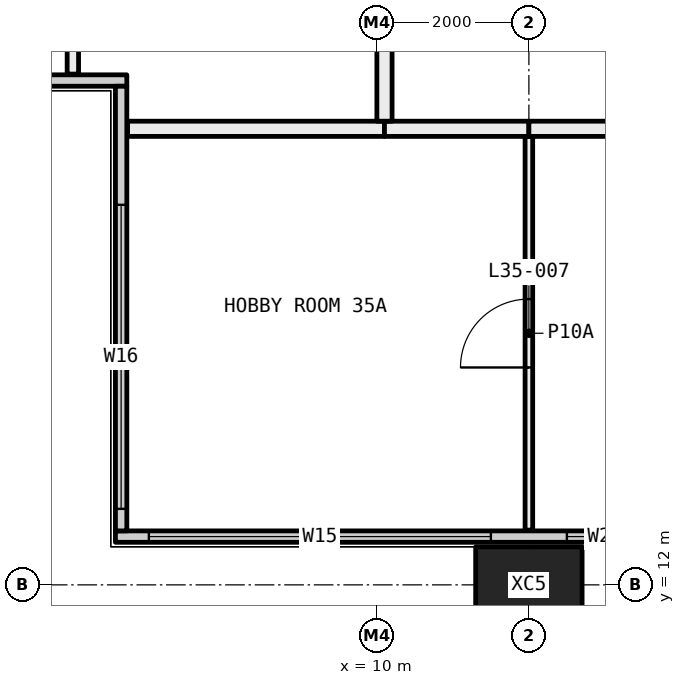
"""IFC4 building model, lengths in metres.
Left out: names, types, materials, properties, quantities, classifications, styles, units other than length and angle.
Written with IfcOpenShell. Run it as: python <this file> out.ifc"""

import sys

from ifc_helpers import new_model, si_unit, direction, frame, frame_2d, origin, origin_2d, place, context, subcontext, project, spatial, rectangle, hollow_rectangle, extrude, element, fill, save


model = new_model("IFC4")
c1 = context("Model", 3, precision=1e-05, world=origin(), true_north=direction((0.0, 1.0)))
c2 = subcontext(c1, "Body", "Model", "MODEL_VIEW")
j1 = project(units=[si_unit("LENGTHUNIT", "METRE"), si_unit("PLANEANGLEUNIT", "RADIAN")], contexts=[c1])
p1 = place(None, origin())
s1 = spatial("IfcSite", under=j1, at=p1, CompositionType="ELEMENT")
p2 = place(p1, origin())
s2 = spatial("IfcBuilding", under=s1, at=p2, CompositionType="ELEMENT")
p3 = place(p2, frame((0.0, 0.0, 134.55)))
s3 = spatial("IfcBuildingStorey", under=s2, at=p3, CompositionType="ELEMENT", Elevation=134.55)
p4 = place(p3, frame((12.0, 12.0, -0.4), z_axis=(0.0, 0.0, 1.0), x_axis=(1.0, 0.0, 0.0)))
e1 = element("IfcColumn", 1, at=p4, inside=s3, PredefinedType="COLUMN", context=c2, shape_type="SweptSolid", body=[
    extrude(hollow_rectangle(XDim=1.4, YDim=1.0, WallThickness=0.055, at=origin_2d()), origin(), (0.0, 0.0, 1.0), 3.45),
])
p5 = place(p3, frame((6.56, 12.635, 0.0), z_axis=(0.0, 0.0, 1.0), x_axis=(1.0, 0.0, 0.0)))
e2 = element("IfcWall", 2, at=p5, inside=s3, PredefinedType="ELEMENTEDWALL", context=c2, shape_type="SweptSolid", body=[
    extrude(rectangle(XDim=58.88, YDim=0.15, at=frame_2d((29.44, 0.0))), origin(), (0.0, 0.0, 1.0), 3.05),
])
p6 = place(p5, frame((0.44, 0.0, 0.45)))
e3 = element("IfcOpeningElement", 3, at=p6, cuts=e2, PredefinedType="OPENING", context=c2, shape_type="SweptSolid", body=[
    extrude(rectangle(XDim=4.5, YDim=2.55, at=frame_2d((2.25, 1.275))), frame((0.0, 0.085, 0.0), z_axis=(0.0, -1.0, 0.0), x_axis=(1.0, 0.0, 0.0)), (0.0, 0.0, 1.0), 0.17),
])
p7 = place(p5, frame((5.94, 0.0, 0.45)))
e4 = element("IfcOpeningElement", 4, at=p7, cuts=e2, PredefinedType="OPENING", context=c2, shape_type="SweptSolid", body=[
    extrude(rectangle(XDim=1.0, YDim=2.55, at=frame_2d((0.5, 1.275))), frame((0.0, 0.085, 0.0), z_axis=(0.0, -1.0, 0.0), x_axis=(1.0, 0.0, 0.0)), (0.0, 0.0, 1.0), 0.17),
])
p8 = place(p5, frame((9.44, 0.0, 0.45)))
e5 = element("IfcOpeningElement", 5, at=p8, cuts=e2, PredefinedType="OPENING", context=c2, shape_type="SweptSolid", body=[
    extrude(rectangle(XDim=1.5, YDim=2.55, at=frame_2d((0.75, 1.275))), frame((0.0, 0.085, 0.0), z_axis=(0.0, -1.0, 0.0), x_axis=(1.0, 0.0, 0.0)), (0.0, 0.0, 1.0), 0.17),
])
p9 = place(p5, frame((11.94, 0.0, 0.45)))
e6 = element("IfcOpeningElement", 6, at=p9, cuts=e2, PredefinedType="OPENING", context=c2, shape_type="SweptSolid", body=[
    extrude(rectangle(XDim=1.5, YDim=2.55, at=frame_2d((0.75, 1.275))), frame((0.0, 0.085, 0.0), z_axis=(0.0, -1.0, 0.0), x_axis=(1.0, 0.0, 0.0)), (0.0, 0.0, 1.0), 0.17),
])
p10 = place(p5, frame((15.94, 0.0, 0.45)))
e7 = element("IfcOpeningElement", 7, at=p10, cuts=e2, PredefinedType="OPENING", context=c2, shape_type="SweptSolid", body=[
    extrude(rectangle(XDim=1.0, YDim=2.55, at=frame_2d((0.5, 1.275))), frame((0.0, 0.085, 0.0), z_axis=(0.0, -1.0, 0.0), x_axis=(1.0, 0.0, 0.0)), (0.0, 0.0, 1.0), 0.17),
])
p11 = place(p5, frame((17.94, 0.0, 0.45)))
e8 = element("IfcOpeningElement", 8, at=p11, cuts=e2, PredefinedType="OPENING", context=c2, shape_type="SweptSolid", body=[
    extrude(rectangle(XDim=1.0, YDim=2.55, at=frame_2d((0.5, 1.275))), frame((0.0, 0.085, 0.0), z_axis=(0.0, -1.0, 0.0), x_axis=(1.0, 0.0, 0.0)), (0.0, 0.0, 1.0), 0.17),
])
p12 = place(p5, frame((21.44, 0.0, 0.45)))
e9 = element("IfcOpeningElement", 9, at=p12, cuts=e2, PredefinedType="OPENING", context=c2, shape_type="SweptSolid", body=[
    extrude(rectangle(XDim=1.5, YDim=2.55, at=frame_2d((0.75, 1.275))), frame((0.0, 0.085, 0.0), z_axis=(0.0, -1.0, 0.0), x_axis=(1.0, 0.0, 0.0)), (0.0, 0.0, 1.0), 0.17),
])
p13 = place(p5, frame((23.94, 0.0, 0.45)))
e10 = element("IfcOpeningElement", 10, at=p13, cuts=e2, PredefinedType="OPENING", context=c2, shape_type="SweptSolid", body=[
    extrude(rectangle(XDim=1.5, YDim=2.55, at=frame_2d((0.75, 1.275))), frame((0.0, 0.085, 0.0), z_axis=(0.0, -1.0, 0.0), x_axis=(1.0, 0.0, 0.0)), (0.0, 0.0, 1.0), 0.17),
])
p14 = place(p5, frame((27.94, 0.0, 0.45)))
e11 = element("IfcOpeningElement", 11, at=p14, cuts=e2, PredefinedType="OPENING", context=c2, shape_type="SweptSolid", body=[
    extrude(rectangle(XDim=1.0, YDim=2.55, at=frame_2d((0.5, 1.275))), frame((0.0, 0.085, 0.0), z_axis=(0.0, -1.0, 0.0), x_axis=(1.0, 0.0, 0.0)), (0.0, 0.0, 1.0), 0.17),
])
p15 = place(p5, frame((29.94, 0.0, 0.45)))
e12 = element("IfcOpeningElement", 12, at=p15, cuts=e2, PredefinedType="OPENING", context=c2, shape_type="SweptSolid", body=[
    extrude(rectangle(XDim=1.0, YDim=2.55, at=frame_2d((0.5, 1.275))), frame((0.0, 0.085, 0.0), z_axis=(0.0, -1.0, 0.0), x_axis=(1.0, 0.0, 0.0)), (0.0, 0.0, 1.0), 0.17),
])
p16 = place(p5, frame((33.44, 0.0, 0.45)))
e13 = element("IfcOpeningElement", 13, at=p16, cuts=e2, PredefinedType="OPENING", context=c2, shape_type="SweptSolid", body=[
    extrude(rectangle(XDim=1.5, YDim=2.55, at=frame_2d((0.75, 1.275))), frame((0.0, 0.085, 0.0), z_axis=(0.0, -1.0, 0.0), x_axis=(1.0, 0.0, 0.0)), (0.0, 0.0, 1.0), 0.17),
])
p17 = place(p5, frame((35.94, 0.0, 0.45)))
e14 = element("IfcOpeningElement", 14, at=p17, cuts=e2, PredefinedType="OPENING", context=c2, shape_type="SweptSolid", body=[
    extrude(rectangle(XDim=1.5, YDim=2.55, at=frame_2d((0.75, 1.275))), frame((0.0, 0.085, 0.0), z_axis=(0.0, -1.0, 0.0), x_axis=(1.0, 0.0, 0.0)), (0.0, 0.0, 1.0), 0.17),
])
p18 = place(p5, frame((39.94, 0.0, 0.45)))
e15 = element("IfcOpeningElement", 15, at=p18, cuts=e2, PredefinedType="OPENING", context=c2, shape_type="SweptSolid", body=[
    extrude(rectangle(XDim=1.0, YDim=2.55, at=frame_2d((0.5, 1.275))), frame((0.0, 0.085, 0.0), z_axis=(0.0, -1.0, 0.0), x_axis=(1.0, 0.0, 0.0)), (0.0, 0.0, 1.0), 0.17),
])
p19 = place(p5, frame((41.94, 0.0, 0.45)))
e16 = element("IfcOpeningElement", 16, at=p19, cuts=e2, PredefinedType="OPENING", context=c2, shape_type="SweptSolid", body=[
    extrude(rectangle(XDim=1.0, YDim=2.55, at=frame_2d((0.5, 1.275))), frame((0.0, 0.085, 0.0), z_axis=(0.0, -1.0, 0.0), x_axis=(1.0, 0.0, 0.0)), (0.0, 0.0, 1.0), 0.17),
])
p20 = place(p5, frame((45.44, 0.0, 0.45)))
e17 = element("IfcOpeningElement", 17, at=p20, cuts=e2, PredefinedType="OPENING", context=c2, shape_type="SweptSolid", body=[
    extrude(rectangle(XDim=1.5, YDim=2.55, at=frame_2d((0.75, 1.275))), frame((0.0, 0.085, 0.0), z_axis=(0.0, -1.0, 0.0), x_axis=(1.0, 0.0, 0.0)), (0.0, 0.0, 1.0), 0.17),
])
p21 = place(p5, frame((47.94, 0.0, 0.45)))
e18 = element("IfcOpeningElement", 18, at=p21, cuts=e2, PredefinedType="OPENING", context=c2, shape_type="SweptSolid", body=[
    extrude(rectangle(XDim=1.5, YDim=2.55, at=frame_2d((0.75, 1.275))), frame((0.0, 0.085, 0.0), z_axis=(0.0, -1.0, 0.0), x_axis=(1.0, 0.0, 0.0)), (0.0, 0.0, 1.0), 0.17),
])
p22 = place(p5, frame((51.94, 0.0, 0.45)))
e19 = element("IfcOpeningElement", 19, at=p22, cuts=e2, PredefinedType="OPENING", context=c2, shape_type="SweptSolid", body=[
    extrude(rectangle(XDim=1.0, YDim=2.55, at=frame_2d((0.5, 1.275))), frame((0.0, 0.085, 0.0), z_axis=(0.0, -1.0, 0.0), x_axis=(1.0, 0.0, 0.0)), (0.0, 0.0, 1.0), 0.17),
])
p23 = place(p5, frame((53.94, 0.0, 0.45)))
e20 = element("IfcOpeningElement", 20, at=p23, cuts=e2, PredefinedType="OPENING", context=c2, shape_type="SweptSolid", body=[
    extrude(rectangle(XDim=4.5, YDim=2.55, at=frame_2d((2.25, 1.275))), frame((0.0, 0.085, 0.0), z_axis=(0.0, -1.0, 0.0), x_axis=(1.0, 0.0, 0.0)), (0.0, 0.0, 1.0), 0.17),
])
p24 = place(p3, frame((0.56, 18.635, 0.0), z_axis=(0.0, 0.0, 1.0), x_axis=(1.0, 0.0, 0.0)))
e21 = element("IfcWall", 21, at=p24, inside=s3, PredefinedType="ELEMENTEDWALL", context=c2, shape_type="SweptSolid", body=[
    extrude(rectangle(XDim=6.15, YDim=0.15, at=frame_2d((3.075, 0.0))), origin(), (0.0, 0.0, 1.0), 3.05),
])
p25 = place(p24, frame((0.44, 0.0, 0.45)))
e22 = element("IfcOpeningElement", 22, at=p25, cuts=e21, PredefinedType="OPENING", context=c2, shape_type="SweptSolid", body=[
    extrude(rectangle(XDim=4.0, YDim=2.55, at=frame_2d((2.0, 1.275))), frame((0.0, 0.085, 0.0), z_axis=(0.0, -1.0, 0.0), x_axis=(1.0, 0.0, 0.0)), (0.0, 0.0, 1.0), 0.17),
])
p26 = place(p3, frame((6.635, 12.71, 0.0), z_axis=(0.0, 0.0, 1.0), x_axis=(0.0, 1.0, 0.0)))
e23 = element("IfcWall", 23, at=p26, inside=s3, PredefinedType="ELEMENTEDWALL", context=c2, shape_type="SweptSolid", body=[
    extrude(rectangle(XDim=5.85, YDim=0.15, at=frame_2d((2.925, 0.0))), origin(), (0.0, 0.0, 1.0), 3.05),
])
p27 = place(p26, frame((0.29, 0.0, 0.45)))
e24 = element("IfcOpeningElement", 24, at=p27, cuts=e23, PredefinedType="OPENING", context=c2, shape_type="SweptSolid", body=[
    extrude(rectangle(XDim=4.0, YDim=2.55, at=frame_2d((2.0, 1.275))), frame((0.0, 0.085, 0.0), z_axis=(0.0, -1.0, 0.0), x_axis=(1.0, 0.0, 0.0)), (0.0, 0.0, 1.0), 0.17),
])
p28 = place(p3, frame((12.0, 12.72, 0.0), z_axis=(0.0, 0.0, 1.0), x_axis=(0.0, 1.0, 0.0)))
e25 = element("IfcWall", 25, at=p28, inside=s3, PredefinedType="PARTITIONING", context=c2, shape_type="SweptSolid", body=[
    extrude(rectangle(XDim=5.18, YDim=0.1, at=frame_2d((2.59, 0.0))), origin(), (0.0, 0.0, 1.0), 3.05),
])
p29 = place(p28, frame((2.14, 0.0, 0.0)))
e26 = element("IfcOpeningElement", 26, at=p29, cuts=e25, PredefinedType="OPENING", context=c2, shape_type="SweptSolid", body=[
    extrude(rectangle(XDim=0.9, YDim=2.1, at=frame_2d((0.45, 1.05))), frame((0.0, 0.06, 0.0), z_axis=(0.0, -1.0, 0.0), x_axis=(1.0, 0.0, 0.0)), (0.0, 0.0, 1.0), 0.12),
])
p30 = place(p3, frame((10.1, 18.0, 0.0), z_axis=(0.0, 0.0, 1.0), x_axis=(-1.0, 0.0, 0.0)))
e27 = element("IfcWall", 27, at=p30, inside=s3, PredefinedType="PARTITIONING", context=c2, shape_type="SweptSolid", body=[
    extrude(rectangle(XDim=3.38, YDim=0.2, at=frame_2d((1.69, 0.0))), origin(), (0.0, 0.0, 1.0), 3.05),
])
p31 = place(p3, frame((12.0, 18.0, 0.0), z_axis=(0.0, 0.0, 1.0), x_axis=(-1.0, 0.0, 0.0)))
e28 = element("IfcWall", 28, at=p31, inside=s3, PredefinedType="PARTITIONING", context=c2, shape_type="SweptSolid", body=[
    extrude(rectangle(XDim=1.9, YDim=0.2, at=frame_2d((0.95, 0.0))), origin(), (0.0, 0.0, 1.0), 3.05),
])
p32 = place(p3, frame((18.0, 18.0, 0.0), z_axis=(0.0, 0.0, 1.0), x_axis=(-1.0, 0.0, 0.0)))
e29 = element("IfcWall", 29, at=p32, inside=s3, PredefinedType="PARTITIONING", context=c2, shape_type="SweptSolid", body=[
    extrude(rectangle(XDim=6.0, YDim=0.2, at=frame_2d((3.0, 0.0))), origin(), (0.0, 0.0, 1.0), 3.05),
])
p33 = place(p3, frame((6.0, 18.72, 0.0), z_axis=(0.0, 0.0, 1.0), x_axis=(0.0, 1.0, 0.0)))
e30 = element("IfcWall", 30, at=p33, inside=s3, PredefinedType="PARTITIONING", context=c2, shape_type="SweptSolid", body=[
    extrude(rectangle(XDim=3.78, YDim=0.15, at=frame_2d((1.89, 0.0))), origin(), (0.0, 0.0, 1.0), 3.05),
])
p34 = place(p3, frame((10.1, 18.1, 0.0), z_axis=(0.0, 0.0, 1.0), x_axis=(0.0, 1.0, 0.0)))
e31 = element("IfcWall", 31, at=p34, inside=s3, PredefinedType="PARTITIONING", context=c2, shape_type="SweptSolid", body=[
    extrude(rectangle(XDim=4.4, YDim=0.2, at=frame_2d((2.2, 0.0))), origin(), (0.0, 0.0, 1.0), 3.05),
])
p35 = place(p6, origin())
e32 = element("IfcWindow", 32, at=p35, inside=s3, PartitioningType="SINGLE_PANEL", PredefinedType="WINDOW", context=c2, shape_type="SweptSolid", body=[
    extrude(rectangle(XDim=4.5, YDim=2.55, at=frame_2d((2.25, 1.275))), frame((0.0, 0.03, 0.0), z_axis=(0.0, -1.0, 0.0), x_axis=(1.0, 0.0, 0.0)), (0.0, 0.0, 1.0), 0.06),
])
fill(e3, e32)
p36 = place(p7, origin())
e33 = element("IfcWindow", 33, at=p36, inside=s3, PartitioningType="SINGLE_PANEL", PredefinedType="WINDOW", context=c2, shape_type="SweptSolid", body=[
    extrude(rectangle(XDim=1.0, YDim=2.55, at=frame_2d((0.5, 1.275))), frame((0.0, 0.03, 0.0), z_axis=(0.0, -1.0, 0.0), x_axis=(1.0, 0.0, 0.0)), (0.0, 0.0, 1.0), 0.06),
])
fill(e4, e33)
p37 = place(p27, origin())
e34 = element("IfcWindow", 34, at=p37, inside=s3, PartitioningType="SINGLE_PANEL", PredefinedType="WINDOW", context=c2, shape_type="SweptSolid", body=[
    extrude(rectangle(XDim=4.0, YDim=2.55, at=frame_2d((2.0, 1.275))), frame((0.0, 0.03, 0.0), z_axis=(0.0, -1.0, 0.0), x_axis=(1.0, 0.0, 0.0)), (0.0, 0.0, 1.0), 0.06),
])
fill(e24, e34)
p38 = place(p29, origin())
e35 = element("IfcDoor", 35, at=p38, inside=s3, OperationType="SINGLE_SWING_RIGHT", PredefinedType="DOOR", context=c2, shape_type="SweptSolid", body=[
    extrude(rectangle(XDim=0.9, YDim=2.1, at=frame_2d((0.45, 1.05))), frame((0.0, 0.025, 0.0), z_axis=(0.0, -1.0, 0.0), x_axis=(1.0, 0.0, 0.0)), (0.0, 0.0, 1.0), 0.05),
])
fill(e26, e35)
save(model, sys.argv[1])
